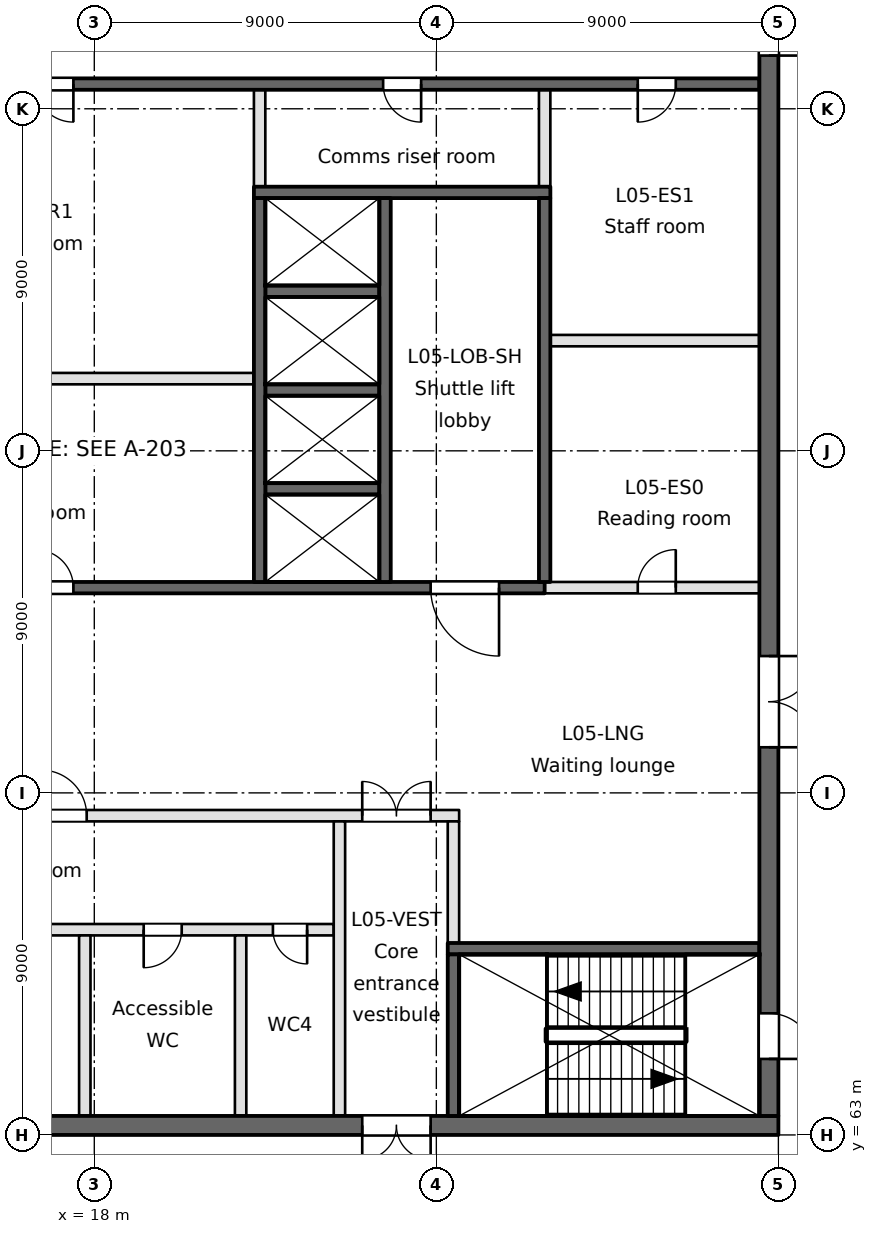
"""IFC4 building model, lengths in metres.
Left out: names, types, materials, properties, quantities, classifications, styles, units other than length and angle.
Written with IfcOpenShell. Run it as: python <this file> out.ifc"""

import sys

from ifc_helpers import new_model, si_unit, direction, frame, frame_2d, origin, place, context, subcontext, project, spatial, rectangle, extrude, element, fill, save


model = new_model("IFC4")
c1 = context("Model", 3, precision=1e-05, world=origin(), true_north=direction((0.0, 1.0)))
c2 = subcontext(c1, "Body", "Model", "MODEL_VIEW")
j1 = project(units=[si_unit("LENGTHUNIT", "METRE"), si_unit("PLANEANGLEUNIT", "RADIAN")], contexts=[c1])
p1 = place(None, origin())
s1 = spatial("IfcSite", under=j1, at=p1, CompositionType="ELEMENT")
p2 = place(p1, origin())
s2 = spatial("IfcBuilding", under=s1, at=p2, CompositionType="ELEMENT")
p3 = place(p2, frame((0.0, 0.0, 26.4)))
s3 = spatial("IfcBuildingStorey", under=s2, at=p3, CompositionType="ELEMENT", Elevation=26.4)
p4 = place(p3, frame((0.9, 63.25, -0.35), z_axis=(0.0, 0.0, 1.0), x_axis=(1.0, 0.0, 0.0)))
e1 = element("IfcWall", 1, at=p4, inside=s3, PredefinedType="SOLIDWALL", context=c2, shape_type="SweptSolid", body=[
    extrude(rectangle(XDim=35.1, YDim=0.5, at=frame_2d((17.55, 0.0))), origin(), (0.0, 0.0, 1.0), 4.7),
])
p5 = place(p4, frame((24.15, 0.0, 0.35)))
e2 = element("IfcOpeningElement", 2, at=p5, cuts=e1, PredefinedType="OPENING", context=c2, shape_type="SweptSolid", body=[
    extrude(rectangle(XDim=1.8, YDim=2.1, at=frame_2d((0.9, 1.05))), frame((0.0, 0.25, 0.0), z_axis=(0.0, -1.0, 0.0), x_axis=(1.0, 0.0, 0.0)), (0.0, 0.0, 1.0), 0.5),
])
p6 = place(p4, frame((1.55, 0.0, 0.35)))
e3 = element("IfcOpeningElement", 3, at=p6, cuts=e1, PredefinedType="OPENING", context=c2, shape_type="SweptSolid", body=[
    extrude(rectangle(XDim=1.2, YDim=2.1, at=frame_2d((0.6, 1.05))), frame((0.0, 0.25, 0.0), z_axis=(0.0, -1.0, 0.0), x_axis=(1.0, 0.0, 0.0)), (0.0, 0.0, 1.0), 0.5),
])
p7 = place(p4, frame((6.15, 0.0, 0.35)))
e4 = element("IfcOpeningElement", 4, at=p7, cuts=e1, PredefinedType="OPENING", context=c2, shape_type="SweptSolid", body=[
    extrude(rectangle(XDim=1.2, YDim=2.1, at=frame_2d((0.6, 1.05))), frame((0.0, 0.25, 0.0), z_axis=(0.0, -1.0, 0.0), x_axis=(1.0, 0.0, 0.0)), (0.0, 0.0, 1.0), 0.5),
])
p8 = place(p3, frame((27.3, 67.9, -0.35), z_axis=(0.0, 0.0, 1.0), x_axis=(1.0, 0.0, 0.0)))
e5 = element("IfcWall", 5, at=p8, inside=s3, PredefinedType="SOLIDWALL", context=c2, shape_type="SweptSolid", body=[
    extrude(rectangle(XDim=8.2, YDim=0.3, at=frame_2d((4.1, 0.0))), origin(), (0.0, 0.0, 1.0), 4.7),
])
p9 = place(p3, frame((10.1, 68.4, 0.0), z_axis=(0.0, 0.0, 1.0), x_axis=(1.0, 0.0, 0.0)))
e6 = element("IfcWall", 6, at=p9, inside=s3, PredefinedType="PARTITIONING", context=c2, shape_type="SweptSolid", body=[
    extrude(rectangle(XDim=14.2, YDim=0.3, at=frame_2d((7.1, 0.0))), origin(), (0.0, 0.0, 1.0), 4.35),
])
p10 = place(p9, frame((1.3, 0.0, 0.0)))
e7 = element("IfcOpeningElement", 7, at=p10, cuts=e6, PredefinedType="OPENING", context=c2, shape_type="SweptSolid", body=[
    extrude(rectangle(XDim=0.9, YDim=2.1, at=frame_2d((0.45, 1.05))), frame((0.0, 0.15, 0.0), z_axis=(0.0, -1.0, 0.0), x_axis=(1.0, 0.0, 0.0)), (0.0, 0.0, 1.0), 0.3),
])
p11 = place(p9, frame((5.2, 0.0, 0.0)))
e8 = element("IfcOpeningElement", 8, at=p11, cuts=e6, PredefinedType="OPENING", context=c2, shape_type="SweptSolid", body=[
    extrude(rectangle(XDim=0.9, YDim=2.1, at=frame_2d((0.45, 1.05))), frame((0.0, 0.15, 0.0), z_axis=(0.0, -1.0, 0.0), x_axis=(1.0, 0.0, 0.0)), (0.0, 0.0, 1.0), 0.3),
])
p12 = place(p9, frame((9.2, 0.0, 0.0)))
e9 = element("IfcOpeningElement", 9, at=p12, cuts=e6, PredefinedType="OPENING", context=c2, shape_type="SweptSolid", body=[
    extrude(rectangle(XDim=1.0, YDim=2.1, at=frame_2d((0.5, 1.05))), frame((0.0, 0.15, 0.0), z_axis=(0.0, -1.0, 0.0), x_axis=(1.0, 0.0, 0.0)), (0.0, 0.0, 1.0), 0.3),
])
p13 = place(p9, frame((12.6, 0.0, 0.0)))
e10 = element("IfcOpeningElement", 10, at=p13, cuts=e6, PredefinedType="OPENING", context=c2, shape_type="SweptSolid", body=[
    extrude(rectangle(XDim=0.9, YDim=2.1, at=frame_2d((0.45, 1.05))), frame((0.0, 0.15, 0.0), z_axis=(0.0, -1.0, 0.0), x_axis=(1.0, 0.0, 0.0)), (0.0, 0.0, 1.0), 0.3),
])
p14 = place(p3, frame((9.95, 71.4, 0.0), z_axis=(0.0, 0.0, 1.0), x_axis=(1.0, 0.0, 0.0)))
e11 = element("IfcWall", 11, at=p14, inside=s3, PredefinedType="PARTITIONING", context=c2, shape_type="SweptSolid", body=[
    extrude(rectangle(XDim=17.65, YDim=0.3, at=frame_2d((8.825, 0.0))), origin(), (0.0, 0.0, 1.0), 4.35),
])
p15 = place(p14, frame((15.1, 0.0, 0.0)))
e12 = element("IfcOpeningElement", 12, at=p15, cuts=e11, PredefinedType="OPENING", context=c2, shape_type="SweptSolid", body=[
    extrude(rectangle(XDim=1.8, YDim=2.1, at=frame_2d((0.9, 1.05))), frame((0.0, 0.15, 0.0), z_axis=(0.0, -1.0, 0.0), x_axis=(1.0, 0.0, 0.0)), (0.0, 0.0, 1.0), 0.3),
])
p16 = place(p14, frame((6.65, 0.0, 0.0)))
e13 = element("IfcOpeningElement", 13, at=p16, cuts=e11, PredefinedType="OPENING", context=c2, shape_type="SweptSolid", body=[
    extrude(rectangle(XDim=1.2, YDim=2.1, at=frame_2d((0.6, 1.05))), frame((0.0, 0.15, 0.0), z_axis=(0.0, -1.0, 0.0), x_axis=(1.0, 0.0, 0.0)), (0.0, 0.0, 1.0), 0.3),
])
p17 = place(p3, frame((0.9, 77.4, -0.35), z_axis=(0.0, 0.0, 1.0), x_axis=(1.0, 0.0, 0.0)))
e14 = element("IfcWall", 14, at=p17, inside=s3, PredefinedType="SOLIDWALL", context=c2, shape_type="SweptSolid", body=[
    extrude(rectangle(XDim=28.95, YDim=0.3, at=frame_2d((14.475, 0.0))), origin(), (0.0, 0.0, 1.0), 4.7),
])
p18 = place(p17, frame((4.35, 0.0, 0.35)))
e15 = element("IfcOpeningElement", 15, at=p18, cuts=e14, PredefinedType="OPENING", context=c2, shape_type="SweptSolid", body=[
    extrude(rectangle(XDim=1.8, YDim=2.1, at=frame_2d((0.9, 1.05))), frame((0.0, 0.15, 0.0), z_axis=(0.0, -1.0, 0.0), x_axis=(1.0, 0.0, 0.0)), (0.0, 0.0, 1.0), 0.3),
])
p19 = place(p17, frame((25.95, 0.0, 0.35)))
e16 = element("IfcOpeningElement", 16, at=p19, cuts=e14, PredefinedType="OPENING", context=c2, shape_type="SweptSolid", body=[
    extrude(rectangle(XDim=1.8, YDim=2.1, at=frame_2d((0.9, 1.05))), frame((0.0, 0.15, 0.0), z_axis=(0.0, -1.0, 0.0), x_axis=(1.0, 0.0, 0.0)), (0.0, 0.0, 1.0), 0.3),
])
p20 = place(p17, frame((15.55, 0.0, 0.35)))
e17 = element("IfcOpeningElement", 17, at=p20, cuts=e14, PredefinedType="OPENING", context=c2, shape_type="SweptSolid", body=[
    extrude(rectangle(XDim=1.0, YDim=2.1, at=frame_2d((0.5, 1.05))), frame((0.0, 0.15, 0.0), z_axis=(0.0, -1.0, 0.0), x_axis=(1.0, 0.0, 0.0)), (0.0, 0.0, 1.0), 0.3),
])
p21 = place(p3, frame((29.85, 77.4, 0.0), z_axis=(0.0, 0.0, 1.0), x_axis=(1.0, 0.0, 0.0)))
e18 = element("IfcWall", 18, at=p21, inside=s3, PredefinedType="PARTITIONING", context=c2, shape_type="SweptSolid", body=[
    extrude(rectangle(XDim=5.65, YDim=0.3, at=frame_2d((2.825, 0.0))), origin(), (0.0, 0.0, 1.0), 4.35),
])
p22 = place(p21, frame((2.45, 0.0, 0.0)))
e19 = element("IfcOpeningElement", 19, at=p22, cuts=e18, PredefinedType="OPENING", context=c2, shape_type="SweptSolid", body=[
    extrude(rectangle(XDim=1.0, YDim=2.1, at=frame_2d((0.5, 1.05))), frame((0.0, 0.15, 0.0), z_axis=(0.0, -1.0, 0.0), x_axis=(1.0, 0.0, 0.0)), (0.0, 0.0, 1.0), 0.3),
])
for number, where, z_axis, x_axis in (
    (20, (22.5, 80.0, -0.35), (0.0, 0.0, 1.0), (1.0, 0.0, 0.0)),
    (21, (22.5, 82.6, -0.35), (0.0, 0.0, 1.0), (1.0, 0.0, 0.0)),
):
    element("IfcWall", number, at=place(p3, frame(where, z_axis=z_axis, x_axis=x_axis)), inside=s3, PredefinedType="SOLIDWALL", context=c2, shape_type="SweptSolid", body=[
        extrude(rectangle(XDim=3.0, YDim=0.3, at=frame_2d((1.5, 0.0))), origin(), (0.0, 0.0, 1.0), 4.7),
    ])
p23 = place(p3, frame((11.7, 82.9, 0.0), z_axis=(0.0, 0.0, 1.0), x_axis=(1.0, 0.0, 0.0)))
e22 = element("IfcWall", 22, at=p23, inside=s3, PredefinedType="PARTITIONING", context=c2, shape_type="SweptSolid", body=[
    extrude(rectangle(XDim=10.5, YDim=0.3, at=frame_2d((5.25, 0.0))), origin(), (0.0, 0.0, 1.0), 4.35),
])
p24 = place(p3, frame((30.0, 83.9, 0.0), z_axis=(0.0, 0.0, 1.0), x_axis=(1.0, 0.0, 0.0)))
e23 = element("IfcWall", 23, at=p24, inside=s3, PredefinedType="PARTITIONING", context=c2, shape_type="SweptSolid", body=[
    extrude(rectangle(XDim=5.5, YDim=0.3, at=frame_2d((2.75, 0.0))), origin(), (0.0, 0.0, 1.0), 4.35),
])
p25 = place(p3, frame((22.5, 85.2, -0.35), z_axis=(0.0, 0.0, 1.0), x_axis=(1.0, 0.0, 0.0)))
e24 = element("IfcWall", 24, at=p25, inside=s3, PredefinedType="SOLIDWALL", context=c2, shape_type="SweptSolid", body=[
    extrude(rectangle(XDim=3.0, YDim=0.3, at=frame_2d((1.5, 0.0))), origin(), (0.0, 0.0, 1.0), 4.7),
])
p26 = place(p3, frame((22.2, 87.8, -0.35), z_axis=(0.0, 0.0, 1.0), x_axis=(1.0, 0.0, 0.0)))
e25 = element("IfcWall", 25, at=p26, inside=s3, PredefinedType="SOLIDWALL", context=c2, shape_type="SweptSolid", body=[
    extrude(rectangle(XDim=7.8, YDim=0.3, at=frame_2d((3.9, 0.0))), origin(), (0.0, 0.0, 1.0), 4.7),
])
p27 = place(p3, frame((0.9, 90.65, -0.35), z_axis=(0.0, 0.0, 1.0), x_axis=(1.0, 0.0, 0.0)))
e26 = element("IfcWall", 26, at=p27, inside=s3, PredefinedType="SOLIDWALL", context=c2, shape_type="SweptSolid", body=[
    extrude(rectangle(XDim=34.6, YDim=0.3, at=frame_2d((17.3, 0.0))), origin(), (0.0, 0.0, 1.0), 4.7),
])
p28 = place(p27, frame((4.75, 0.0, 0.35)))
e27 = element("IfcOpeningElement", 27, at=p28, cuts=e26, PredefinedType="OPENING", context=c2, shape_type="SweptSolid", body=[
    extrude(rectangle(XDim=1.0, YDim=2.1, at=frame_2d((0.5, 1.05))), frame((0.0, 0.15, 0.0), z_axis=(0.0, -1.0, 0.0), x_axis=(1.0, 0.0, 0.0)), (0.0, 0.0, 1.0), 0.3),
])
p29 = place(p27, frame((24.7, 0.0, 0.35)))
e28 = element("IfcOpeningElement", 28, at=p29, cuts=e26, PredefinedType="OPENING", context=c2, shape_type="SweptSolid", body=[
    extrude(rectangle(XDim=1.0, YDim=2.1, at=frame_2d((0.5, 1.05))), frame((0.0, 0.15, 0.0), z_axis=(0.0, -1.0, 0.0), x_axis=(1.0, 0.0, 0.0)), (0.0, 0.0, 1.0), 0.3),
])
p30 = place(p27, frame((15.55, 0.0, 0.35)))
e29 = element("IfcOpeningElement", 29, at=p30, cuts=e26, PredefinedType="OPENING", context=c2, shape_type="SweptSolid", body=[
    extrude(rectangle(XDim=1.0, YDim=2.1, at=frame_2d((0.5, 1.05))), frame((0.0, 0.15, 0.0), z_axis=(0.0, -1.0, 0.0), x_axis=(1.0, 0.0, 0.0)), (0.0, 0.0, 1.0), 0.3),
])
p31 = place(p27, frame((31.4, 0.0, 0.35)))
e30 = element("IfcOpeningElement", 30, at=p31, cuts=e26, PredefinedType="OPENING", context=c2, shape_type="SweptSolid", body=[
    extrude(rectangle(XDim=1.0, YDim=2.1, at=frame_2d((0.5, 1.05))), frame((0.0, 0.15, 0.0), z_axis=(0.0, -1.0, 0.0), x_axis=(1.0, 0.0, 0.0)), (0.0, 0.0, 1.0), 0.3),
])
for number, where, z_axis, x_axis in (
    (31, (17.75, 63.5, 0.0), (0.0, 0.0, 1.0), (0.0, 1.0, 0.0)),
    (32, (21.85, 63.5, 0.0), (0.0, 0.0, 1.0), (0.0, 1.0, 0.0)),
):
    element("IfcWall", number, at=place(p3, frame(where, z_axis=z_axis, x_axis=x_axis)), inside=s3, PredefinedType="PARTITIONING", context=c2, shape_type="SweptSolid", body=[
        extrude(rectangle(XDim=4.75, YDim=0.3, at=frame_2d((2.375, 0.0))), origin(), (0.0, 0.0, 1.0), 4.35),
    ])
p32 = place(p3, frame((22.35, 77.55, -0.35), z_axis=(0.0, 0.0, 1.0), x_axis=(0.0, 1.0, 0.0)))
e33 = element("IfcWall", 33, at=p32, inside=s3, PredefinedType="SOLIDWALL", context=c2, shape_type="SweptSolid", body=[
    extrude(rectangle(XDim=10.1, YDim=0.3, at=frame_2d((5.05, 0.0))), origin(), (0.0, 0.0, 1.0), 4.7),
])
p33 = place(p3, frame((22.35, 87.95, 0.0), z_axis=(0.0, 0.0, 1.0), x_axis=(0.0, 1.0, 0.0)))
e34 = element("IfcWall", 34, at=p33, inside=s3, PredefinedType="PARTITIONING", context=c2, shape_type="SweptSolid", body=[
    extrude(rectangle(XDim=2.55, YDim=0.3, at=frame_2d((1.275, 0.0))), origin(), (0.0, 0.0, 1.0), 4.35),
])
p34 = place(p3, frame((24.45, 63.5, 0.0), z_axis=(0.0, 0.0, 1.0), x_axis=(0.0, 1.0, 0.0)))
e35 = element("IfcWall", 35, at=p34, inside=s3, PredefinedType="PARTITIONING", context=c2, shape_type="SweptSolid", body=[
    extrude(rectangle(XDim=7.75, YDim=0.3, at=frame_2d((3.875, 0.0))), origin(), (0.0, 0.0, 1.0), 4.35),
])
p35 = place(p3, frame((25.65, 77.55, -0.35), z_axis=(0.0, 0.0, 1.0), x_axis=(0.0, 1.0, 0.0)))
e36 = element("IfcWall", 36, at=p35, inside=s3, PredefinedType="SOLIDWALL", context=c2, shape_type="SweptSolid", body=[
    extrude(rectangle(XDim=10.1, YDim=0.3, at=frame_2d((5.05, 0.0))), origin(), (0.0, 0.0, 1.0), 4.7),
])
p36 = place(p3, frame((27.45, 63.5, -0.35), z_axis=(0.0, 0.0, 1.0), x_axis=(0.0, 1.0, 0.0)))
e37 = element("IfcWall", 37, at=p36, inside=s3, PredefinedType="SOLIDWALL", context=c2, shape_type="SweptSolid", body=[
    extrude(rectangle(XDim=4.25, YDim=0.3, at=frame_2d((2.125, 0.0))), origin(), (0.0, 0.0, 1.0), 4.7),
])
p37 = place(p3, frame((27.45, 68.05, 0.0), z_axis=(0.0, 0.0, 1.0), x_axis=(0.0, 1.0, 0.0)))
e38 = element("IfcWall", 38, at=p37, inside=s3, PredefinedType="PARTITIONING", context=c2, shape_type="SweptSolid", body=[
    extrude(rectangle(XDim=3.2, YDim=0.3, at=frame_2d((1.6, 0.0))), origin(), (0.0, 0.0, 1.0), 4.35),
])
p38 = place(p3, frame((29.85, 77.55, -0.35), z_axis=(0.0, 0.0, 1.0), x_axis=(0.0, 1.0, 0.0)))
e39 = element("IfcWall", 39, at=p38, inside=s3, PredefinedType="SOLIDWALL", context=c2, shape_type="SweptSolid", body=[
    extrude(rectangle(XDim=10.1, YDim=0.3, at=frame_2d((5.05, 0.0))), origin(), (0.0, 0.0, 1.0), 4.7),
])
p39 = place(p3, frame((29.85, 87.95, 0.0), z_axis=(0.0, 0.0, 1.0), x_axis=(0.0, 1.0, 0.0)))
e40 = element("IfcWall", 40, at=p39, inside=s3, PredefinedType="PARTITIONING", context=c2, shape_type="SweptSolid", body=[
    extrude(rectangle(XDim=2.55, YDim=0.3, at=frame_2d((1.275, 0.0))), origin(), (0.0, 0.0, 1.0), 4.35),
])
p40 = place(p3, frame((35.75, 63.5, -0.35), z_axis=(0.0, 0.0, 1.0), x_axis=(0.0, 1.0, 0.0)))
e41 = element("IfcWall", 41, at=p40, inside=s3, PredefinedType="SOLIDWALL", context=c2, shape_type="SweptSolid", body=[
    extrude(rectangle(XDim=34.6, YDim=0.5, at=frame_2d((17.3, 0.0))), origin(), (0.0, 0.0, 1.0), 4.7),
])
p41 = place(p40, frame((9.7, 0.0, 0.35)))
e42 = element("IfcOpeningElement", 42, at=p41, cuts=e41, PredefinedType="OPENING", context=c2, shape_type="SweptSolid", body=[
    extrude(rectangle(XDim=2.4, YDim=2.1, at=frame_2d((1.2, 1.05))), frame((0.0, 0.25, 0.0), z_axis=(0.0, -1.0, 0.0), x_axis=(1.0, 0.0, 0.0)), (0.0, 0.0, 1.0), 0.5),
])
p42 = place(p40, frame((27.9, 0.0, 0.35)))
e43 = element("IfcOpeningElement", 43, at=p42, cuts=e41, PredefinedType="OPENING", context=c2, shape_type="SweptSolid", body=[
    extrude(rectangle(XDim=1.5, YDim=2.1, at=frame_2d((0.75, 1.05))), frame((0.0, 0.25, 0.0), z_axis=(0.0, -1.0, 0.0), x_axis=(1.0, 0.0, 0.0)), (0.0, 0.0, 1.0), 0.5),
])
p43 = place(p40, frame((1.5, 0.0, 0.35)))
e44 = element("IfcOpeningElement", 44, at=p43, cuts=e41, PredefinedType="OPENING", context=c2, shape_type="SweptSolid", body=[
    extrude(rectangle(XDim=1.2, YDim=2.1, at=frame_2d((0.6, 1.05))), frame((0.0, 0.25, 0.0), z_axis=(0.0, -1.0, 0.0), x_axis=(1.0, 0.0, 0.0)), (0.0, 0.0, 1.0), 0.5),
])
p44 = place(p19, frame((1.8, 0.0, 0.0), z_axis=(0.0, 0.0, 1.0), x_axis=(-1.0, 0.0, 0.0)))
e45 = element("IfcDoor", 45, at=p44, inside=s3, OperationType="SINGLE_SWING_LEFT", PredefinedType="DOOR", context=c2, shape_type="SweptSolid", body=[
    extrude(rectangle(XDim=1.8, YDim=2.1, at=frame_2d((0.9, 1.05))), frame((0.0, 0.025, 0.0), z_axis=(0.0, -1.0, 0.0), x_axis=(1.0, 0.0, 0.0)), (0.0, 0.0, 1.0), 0.05),
])
fill(e16, e45)
p45 = place(p41, frame((2.4, 0.0, 0.0), z_axis=(0.0, 0.0, 1.0), x_axis=(-1.0, 0.0, 0.0)))
e46 = element("IfcDoor", 46, at=p45, inside=s3, OperationType="DOUBLE_DOOR_SINGLE_SWING", PredefinedType="DOOR", context=c2, shape_type="SweptSolid", body=[
    extrude(rectangle(XDim=2.4, YDim=2.1, at=frame_2d((1.2, 1.05))), frame((0.0, 0.025, 0.0), z_axis=(0.0, -1.0, 0.0), x_axis=(1.0, 0.0, 0.0)), (0.0, 0.0, 1.0), 0.05),
])
fill(e42, e46)
p46 = place(p42, frame((1.5, 0.0, 0.0), z_axis=(0.0, 0.0, 1.0), x_axis=(-1.0, 0.0, 0.0)))
e47 = element("IfcDoor", 47, at=p46, inside=s3, OperationType="SINGLE_SWING_RIGHT", PredefinedType="DOOR", context=c2, shape_type="SweptSolid", body=[
    extrude(rectangle(XDim=1.5, YDim=2.1, at=frame_2d((0.75, 1.05))), frame((0.0, 0.025, 0.0), z_axis=(0.0, -1.0, 0.0), x_axis=(1.0, 0.0, 0.0)), (0.0, 0.0, 1.0), 0.05),
])
fill(e43, e47)
p47 = place(p5, frame((1.8, 0.0, 0.0), z_axis=(0.0, 0.0, 1.0), x_axis=(-1.0, 0.0, 0.0)))
e48 = element("IfcDoor", 48, at=p47, inside=s3, OperationType="DOUBLE_DOOR_SINGLE_SWING", PredefinedType="DOOR", context=c2, shape_type="SweptSolid", body=[
    extrude(rectangle(XDim=1.8, YDim=2.1, at=frame_2d((0.9, 1.05))), frame((0.0, 0.025, 0.0), z_axis=(0.0, -1.0, 0.0), x_axis=(1.0, 0.0, 0.0)), (0.0, 0.0, 1.0), 0.05),
])
fill(e2, e48)
p48 = place(p15, origin())
e49 = element("IfcDoor", 49, at=p48, inside=s3, OperationType="DOUBLE_DOOR_SINGLE_SWING", PredefinedType="DOOR", context=c2, shape_type="SweptSolid", body=[
    extrude(rectangle(XDim=1.8, YDim=2.1, at=frame_2d((0.9, 1.05))), frame((0.0, 0.025, 0.0), z_axis=(0.0, -1.0, 0.0), x_axis=(1.0, 0.0, 0.0)), (0.0, 0.0, 1.0), 0.05),
])
fill(e12, e49)
p49 = place(p12, frame((1.0, 0.0, 0.0), z_axis=(0.0, 0.0, 1.0), x_axis=(-1.0, 0.0, 0.0)))
e50 = element("IfcDoor", 50, at=p49, inside=s3, OperationType="SINGLE_SWING_RIGHT", PredefinedType="DOOR", context=c2, shape_type="SweptSolid", body=[
    extrude(rectangle(XDim=1.0, YDim=2.1, at=frame_2d((0.5, 1.05))), frame((0.0, 0.025, 0.0), z_axis=(0.0, -1.0, 0.0), x_axis=(1.0, 0.0, 0.0)), (0.0, 0.0, 1.0), 0.05),
])
fill(e9, e50)
p50 = place(p13, frame((0.9, 0.0, 0.0), z_axis=(0.0, 0.0, 1.0), x_axis=(-1.0, 0.0, 0.0)))
e51 = element("IfcDoor", 51, at=p50, inside=s3, OperationType="SINGLE_SWING_LEFT", PredefinedType="DOOR", context=c2, shape_type="SweptSolid", body=[
    extrude(rectangle(XDim=0.9, YDim=2.1, at=frame_2d((0.45, 1.05))), frame((0.0, 0.025, 0.0), z_axis=(0.0, -1.0, 0.0), x_axis=(1.0, 0.0, 0.0)), (0.0, 0.0, 1.0), 0.05),
])
fill(e10, e51)
p51 = place(p16, origin())
e52 = element("IfcDoor", 52, at=p51, inside=s3, OperationType="SINGLE_SWING_LEFT", PredefinedType="DOOR", context=c2, shape_type="SweptSolid", body=[
    extrude(rectangle(XDim=1.2, YDim=2.1, at=frame_2d((0.6, 1.05))), frame((0.0, 0.025, 0.0), z_axis=(0.0, -1.0, 0.0), x_axis=(1.0, 0.0, 0.0)), (0.0, 0.0, 1.0), 0.05),
])
fill(e13, e52)
p52 = place(p43, frame((1.2, 0.0, 0.0), z_axis=(0.0, 0.0, 1.0), x_axis=(-1.0, 0.0, 0.0)))
e53 = element("IfcDoor", 53, at=p52, inside=s3, OperationType="SINGLE_SWING_RIGHT", PredefinedType="DOOR", context=c2, shape_type="SweptSolid", body=[
    extrude(rectangle(XDim=1.2, YDim=2.1, at=frame_2d((0.6, 1.05))), frame((0.0, 0.025, 0.0), z_axis=(0.0, -1.0, 0.0), x_axis=(1.0, 0.0, 0.0)), (0.0, 0.0, 1.0), 0.05),
])
fill(e44, e53)
p53 = place(p29, frame((1.0, 0.0, 0.0), z_axis=(0.0, 0.0, 1.0), x_axis=(-1.0, 0.0, 0.0)))
e54 = element("IfcDoor", 54, at=p53, inside=s3, OperationType="SINGLE_SWING_LEFT", PredefinedType="DOOR", context=c2, shape_type="SweptSolid", body=[
    extrude(rectangle(XDim=1.0, YDim=2.1, at=frame_2d((0.5, 1.05))), frame((0.0, 0.025, 0.0), z_axis=(0.0, -1.0, 0.0), x_axis=(1.0, 0.0, 0.0)), (0.0, 0.0, 1.0), 0.05),
])
fill(e28, e54)
p54 = place(p20, origin())
e55 = element("IfcDoor", 55, at=p54, inside=s3, OperationType="SINGLE_SWING_LEFT", PredefinedType="DOOR", context=c2, shape_type="SweptSolid", body=[
    extrude(rectangle(XDim=1.0, YDim=2.1, at=frame_2d((0.5, 1.05))), frame((0.0, 0.025, 0.0), z_axis=(0.0, -1.0, 0.0), x_axis=(1.0, 0.0, 0.0)), (0.0, 0.0, 1.0), 0.05),
])
fill(e17, e55)
p55 = place(p30, frame((1.0, 0.0, 0.0), z_axis=(0.0, 0.0, 1.0), x_axis=(-1.0, 0.0, 0.0)))
e56 = element("IfcDoor", 56, at=p55, inside=s3, OperationType="SINGLE_SWING_LEFT", PredefinedType="DOOR", context=c2, shape_type="SweptSolid", body=[
    extrude(rectangle(XDim=1.0, YDim=2.1, at=frame_2d((0.5, 1.05))), frame((0.0, 0.025, 0.0), z_axis=(0.0, -1.0, 0.0), x_axis=(1.0, 0.0, 0.0)), (0.0, 0.0, 1.0), 0.05),
])
fill(e29, e56)
p56 = place(p22, origin())
e57 = element("IfcDoor", 57, at=p56, inside=s3, OperationType="SINGLE_SWING_RIGHT", PredefinedType="DOOR", context=c2, shape_type="SweptSolid", body=[
    extrude(rectangle(XDim=1.0, YDim=2.1, at=frame_2d((0.5, 1.05))), frame((0.0, 0.025, 0.0), z_axis=(0.0, -1.0, 0.0), x_axis=(1.0, 0.0, 0.0)), (0.0, 0.0, 1.0), 0.05),
])
fill(e19, e57)
p57 = place(p31, frame((1.0, 0.0, 0.0), z_axis=(0.0, 0.0, 1.0), x_axis=(-1.0, 0.0, 0.0)))
e58 = element("IfcDoor", 58, at=p57, inside=s3, OperationType="SINGLE_SWING_RIGHT", PredefinedType="DOOR", context=c2, shape_type="SweptSolid", body=[
    extrude(rectangle(XDim=1.0, YDim=2.1, at=frame_2d((0.5, 1.05))), frame((0.0, 0.025, 0.0), z_axis=(0.0, -1.0, 0.0), x_axis=(1.0, 0.0, 0.0)), (0.0, 0.0, 1.0), 0.05),
])
fill(e30, e58)
save(model, sys.argv[1])
